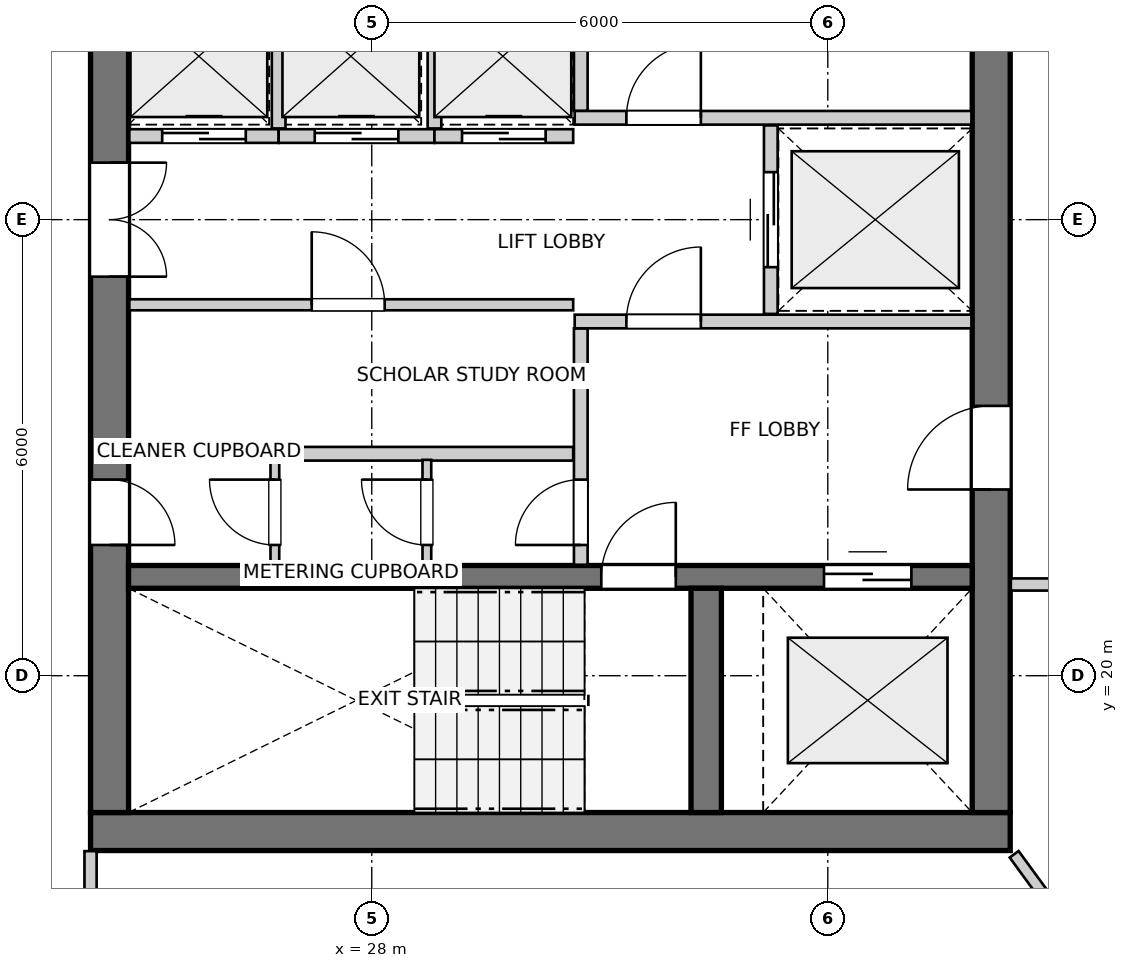
"""IFC4 building model, lengths in metres.
Left out: names, types, materials, properties, quantities, classifications, styles, units other than length and angle.
Written with IfcOpenShell. Run it as: python <this file> out.ifc"""

import sys

from ifc_helpers import new_model, si_unit, direction, frame, frame_2d, origin, place, context, subcontext, project, spatial, rectangle, extrude, source, transform, mapped, element, fill, save


model = new_model("IFC4")
c1 = context("Model", 3, precision=1e-05, world=origin(), true_north=direction((0.0, 1.0)))
c2 = subcontext(c1, "Body", "Model", "MODEL_VIEW")
j1 = project(units=[si_unit("LENGTHUNIT", "METRE"), si_unit("PLANEANGLEUNIT", "RADIAN")], contexts=[c1])
p1 = place(None, origin())
s1 = spatial("IfcSite", under=j1, at=p1, CompositionType="ELEMENT")
p2 = place(p1, origin())
s2 = spatial("IfcBuilding", under=s1, at=p2, CompositionType="ELEMENT")
p3 = place(p2, frame((0.0, 0.0, 221.2)))
s3 = spatial("IfcBuildingStorey", under=s2, at=p3, CompositionType="ELEMENT", Elevation=221.2)
p4 = place(p3, frame((24.3, 17.95, 0.0), z_axis=(0.0, 0.0, 1.0), x_axis=(1.0, 0.0, 0.0)))
e1 = element("IfcWall", 1, at=p4, inside=s3, PredefinedType="SHEAR", context=c2, shape_type="SweptSolid", body=[
    extrude(rectangle(XDim=12.1, YDim=0.5, at=frame_2d((6.05, 0.0))), origin(), (0.0, 0.0, 1.0), 2.96),
])
p5 = place(p3, frame((24.55, 33.8, 0.0), z_axis=(0.0, 0.0, 1.0), x_axis=(0.0, -1.0, 0.0)))
e2 = element("IfcWall", 2, at=p5, inside=s3, PredefinedType="SHEAR", context=c2, shape_type="SweptSolid", body=[
    extrude(rectangle(XDim=15.6, YDim=0.5, at=frame_2d((7.8, 0.0))), origin(), (0.0, 0.0, 1.0), 2.96),
])
p6 = place(p5, frame((7.05, 0.0, 0.0)))
e3 = element("IfcOpeningElement", 3, at=p6, cuts=e2, PredefinedType="OPENING", context=c2, shape_type="SweptSolid", body=[
    extrude(rectangle(XDim=1.5, YDim=2.15, at=frame_2d((0.75, 1.075))), frame((0.0, 0.26, 0.0), z_axis=(0.0, -1.0, 0.0), x_axis=(1.0, 0.0, 0.0)), (0.0, 0.0, 1.0), 0.52),
])
p7 = place(p5, frame((3.52, 0.0, 0.0)))
e4 = element("IfcOpeningElement", 4, at=p7, cuts=e2, PredefinedType="OPENING", context=c2, shape_type="SweptSolid", body=[
    extrude(rectangle(XDim=0.86, YDim=2.05, at=frame_2d((0.43, 1.025))), frame((0.0, 0.26, 0.0), z_axis=(0.0, -1.0, 0.0), x_axis=(1.0, 0.0, 0.0)), (0.0, 0.0, 1.0), 0.52),
])
p8 = place(p5, frame((11.22, 0.0, 0.0)))
e5 = element("IfcOpeningElement", 5, at=p8, cuts=e2, PredefinedType="OPENING", context=c2, shape_type="SweptSolid", body=[
    extrude(rectangle(XDim=0.86, YDim=2.05, at=frame_2d((0.43, 1.025))), frame((0.0, 0.26, 0.0), z_axis=(0.0, -1.0, 0.0), x_axis=(1.0, 0.0, 0.0)), (0.0, 0.0, 1.0), 0.52),
])
p9 = place(p3, frame((36.15, 18.2, 0.0), z_axis=(0.0, 0.0, 1.0), x_axis=(0.0, 1.0, 0.0)))
e6 = element("IfcWall", 6, at=p9, inside=s3, PredefinedType="SHEAR", context=c2, shape_type="SweptSolid", body=[
    extrude(rectangle(XDim=15.6, YDim=0.5, at=frame_2d((7.8, 0.0))), origin(), (0.0, 0.0, 1.0), 2.96),
])
p10 = place(p9, frame((4.25, 0.0, 0.0)))
e7 = element("IfcOpeningElement", 7, at=p10, cuts=e6, PredefinedType="OPENING", context=c2, shape_type="SweptSolid", body=[
    extrude(rectangle(XDim=1.1, YDim=2.15, at=frame_2d((0.55, 1.075))), frame((0.0, 0.26, 0.0), z_axis=(0.0, -1.0, 0.0), x_axis=(1.0, 0.0, 0.0)), (0.0, 0.0, 1.0), 0.52),
])
p11 = place(p9, frame((10.25, 0.0, 0.0)))
e8 = element("IfcOpeningElement", 8, at=p11, cuts=e6, PredefinedType="OPENING", context=c2, shape_type="SweptSolid", body=[
    extrude(rectangle(XDim=1.1, YDim=2.15, at=frame_2d((0.55, 1.075))), frame((0.0, 0.26, 0.0), z_axis=(0.0, -1.0, 0.0), x_axis=(1.0, 0.0, 0.0)), (0.0, 0.0, 1.0), 0.52),
])
p12 = place(p3, frame((24.8, 21.3, 0.0), z_axis=(0.0, 0.0, 1.0), x_axis=(1.0, 0.0, 0.0)))
e9 = element("IfcWall", 9, at=p12, inside=s3, PredefinedType="SHEAR", context=c2, shape_type="SweptSolid", body=[
    extrude(rectangle(XDim=11.1, YDim=0.3, at=frame_2d((5.55, 0.0))), origin(), (0.0, 0.0, 1.0), 2.96),
])
p13 = place(p12, frame((6.22, 0.0, 0.0)))
e10 = element("IfcOpeningElement", 10, at=p13, cuts=e9, PredefinedType="OPENING", context=c2, shape_type="SweptSolid", body=[
    extrude(rectangle(XDim=0.98, YDim=2.15, at=frame_2d((0.49, 1.075))), frame((0.0, 0.16, 0.0), z_axis=(0.0, -1.0, 0.0), x_axis=(1.0, 0.0, 0.0)), (0.0, 0.0, 1.0), 0.32),
])
p14 = place(p12, frame((9.15, 0.0, 0.0)))
e11 = element("IfcOpeningElement", 11, at=p14, cuts=e9, PredefinedType="OPENING", context=c2, shape_type="SweptSolid", body=[
    extrude(rectangle(XDim=1.15, YDim=2.15, at=frame_2d((0.575, 1.075))), frame((0.0, 0.16, 0.0), z_axis=(0.0, -1.0, 0.0), x_axis=(1.0, 0.0, 0.0)), (0.0, 0.0, 1.0), 0.32),
])
p15 = place(p3, frame((32.4, 18.2, 0.0), z_axis=(0.0, 0.0, 1.0), x_axis=(0.0, 1.0, 0.0)))
e12 = element("IfcWall", 12, at=p15, inside=s3, PredefinedType="SHEAR", context=c2, shape_type="SweptSolid", body=[
    extrude(rectangle(XDim=2.95, YDim=0.4, at=frame_2d((1.475, 0.0))), origin(), (0.0, 0.0, 1.0), 2.96),
])
p16 = place(p3, frame((30.75, 21.46, 0.0), z_axis=(0.0, 0.0, 1.0), x_axis=(0.0, 1.0, 0.0)))
e13 = element("IfcWall", 13, at=p16, inside=s3, PredefinedType="PARTITIONING", context=c2, shape_type="SweptSolid", body=[
    extrude(rectangle(XDim=3.11, YDim=0.18, at=frame_2d((1.555, 0.0))), origin(), (0.0, 0.0, 1.0), 2.96),
])
p17 = place(p16, frame((0.26, 0.0, 0.0)))
e14 = element("IfcOpeningElement", 14, at=p17, cuts=e13, PredefinedType="OPENING", context=c2, shape_type="SweptSolid", body=[
    extrude(rectangle(XDim=0.86, YDim=2.05, at=frame_2d((0.43, 1.025))), frame((0.0, 0.1, 0.0), z_axis=(0.0, -1.0, 0.0), x_axis=(1.0, 0.0, 0.0)), (0.0, 0.0, 1.0), 0.2),
])
p18 = place(p3, frame((30.67, 24.66, 0.0), z_axis=(0.0, 0.0, 1.0), x_axis=(1.0, 0.0, 0.0)))
e15 = element("IfcWall", 15, at=p18, inside=s3, PredefinedType="PARTITIONING", context=c2, shape_type="SweptSolid", body=[
    extrude(rectangle(XDim=5.22, YDim=0.18, at=frame_2d((2.61, 0.0))), origin(), (0.0, 0.0, 1.0), 2.96),
])
p19 = place(p18, frame((0.68, 0.0, 0.0)))
e16 = element("IfcOpeningElement", 16, at=p19, cuts=e15, PredefinedType="OPENING", context=c2, shape_type="SweptSolid", body=[
    extrude(rectangle(XDim=0.98, YDim=2.15, at=frame_2d((0.49, 1.075))), frame((0.0, 0.1, 0.0), z_axis=(0.0, -1.0, 0.0), x_axis=(1.0, 0.0, 0.0)), (0.0, 0.0, 1.0), 0.2),
])
p20 = place(p3, frame((30.75, 27.43, 0.0), z_axis=(0.0, 0.0, 1.0), x_axis=(0.0, 1.0, 0.0)))
e17 = element("IfcWall", 17, at=p20, inside=s3, PredefinedType="PARTITIONING", context=c2, shape_type="SweptSolid", body=[
    extrude(rectangle(XDim=3.11, YDim=0.18, at=frame_2d((1.555, 0.0))), origin(), (0.0, 0.0, 1.0), 2.96),
])
p21 = place(p20, frame((1.98, 0.0, 0.0)))
e18 = element("IfcOpeningElement", 18, at=p21, cuts=e17, PredefinedType="OPENING", context=c2, shape_type="SweptSolid", body=[
    extrude(rectangle(XDim=0.86, YDim=2.05, at=frame_2d((0.43, 1.025))), frame((0.0, 0.1, 0.0), z_axis=(0.0, -1.0, 0.0), x_axis=(1.0, 0.0, 0.0)), (0.0, 0.0, 1.0), 0.2),
])
p22 = place(p3, frame((30.67, 27.34, 0.0), z_axis=(0.0, 0.0, 1.0), x_axis=(1.0, 0.0, 0.0)))
e19 = element("IfcWall", 19, at=p22, inside=s3, PredefinedType="PARTITIONING", context=c2, shape_type="SweptSolid", body=[
    extrude(rectangle(XDim=5.22, YDim=0.18, at=frame_2d((2.61, 0.0))), origin(), (0.0, 0.0, 1.0), 2.96),
])
p23 = place(p22, frame((0.68, 0.0, 0.0)))
e20 = element("IfcOpeningElement", 20, at=p23, cuts=e19, PredefinedType="OPENING", context=c2, shape_type="SweptSolid", body=[
    extrude(rectangle(XDim=0.98, YDim=2.15, at=frame_2d((0.49, 1.075))), frame((0.0, 0.1, 0.0), z_axis=(0.0, -1.0, 0.0), x_axis=(1.0, 0.0, 0.0)), (0.0, 0.0, 1.0), 0.2),
])
p24 = place(p3, frame((33.25, 24.76, 0.0), z_axis=(0.0, 0.0, 1.0), x_axis=(0.0, 1.0, 0.0)))
e21 = element("IfcWall", 21, at=p24, inside=s3, PredefinedType="PARTITIONING", context=c2, shape_type="SweptSolid", body=[
    extrude(rectangle(XDim=2.48, YDim=0.18, at=frame_2d((1.24, 0.0))), origin(), (0.0, 0.0, 1.0), 2.96),
])
p25 = place(p24, frame((0.615, 0.0, 0.0)))
e22 = element("IfcOpeningElement", 22, at=p25, cuts=e21, PredefinedType="OPENING", context=c2, shape_type="SweptSolid", body=[
    extrude(rectangle(XDim=1.25, YDim=2.15, at=frame_2d((0.625, 1.075))), frame((0.0, 0.1, 0.0), z_axis=(0.0, -1.0, 0.0), x_axis=(1.0, 0.0, 0.0)), (0.0, 0.0, 1.0), 0.2),
])
p26 = place(p3, frame((24.81, 22.92, 0.0), z_axis=(0.0, 0.0, 1.0), x_axis=(1.0, 0.0, 0.0)))
e23 = element("IfcWall", 23, at=p26, inside=s3, PredefinedType="PARTITIONING", context=c2, shape_type="SweptSolid", body=[
    extrude(rectangle(XDim=5.84, YDim=0.18, at=frame_2d((2.92, 0.0))), origin(), (0.0, 0.0, 1.0), 2.96),
])
p27 = place(p3, frame((24.81, 24.88, 0.0), z_axis=(0.0, 0.0, 1.0), x_axis=(1.0, 0.0, 0.0)))
e24 = element("IfcWall", 24, at=p27, inside=s3, PredefinedType="PARTITIONING", context=c2, shape_type="SweptSolid", body=[
    extrude(rectangle(XDim=5.84, YDim=0.145, at=frame_2d((2.92, 0.0))), origin(), (0.0, 0.0, 1.0), 2.96),
])
p28 = place(p27, frame((2.4, 0.0, 0.0)))
e25 = element("IfcOpeningElement", 25, at=p28, cuts=e24, PredefinedType="OPENING", context=c2, shape_type="SweptSolid", body=[
    extrude(rectangle(XDim=0.96, YDim=2.1, at=frame_2d((0.48, 1.05))), frame((0.0, 0.083, 0.0), z_axis=(0.0, -1.0, 0.0), x_axis=(1.0, 0.0, 0.0)), (0.0, 0.0, 1.0), 0.165),
])
p29 = place(p3, frame((24.81, 27.1, 0.0), z_axis=(0.0, 0.0, 1.0), x_axis=(1.0, 0.0, 0.0)))
e26 = element("IfcWall", 26, at=p29, inside=s3, PredefinedType="PARTITIONING", context=c2, shape_type="SweptSolid", body=[
    extrude(rectangle(XDim=1.965, YDim=0.18, at=frame_2d((0.982, 0.0))), origin(), (0.0, 0.0, 1.0), 2.96),
])
p30 = place(p29, frame((0.433, 0.0, 0.0)))
e27 = element("IfcOpeningElement", 27, at=p30, cuts=e26, PredefinedType="OPENING", context=c2, shape_type="SweptSolid", body=[
    extrude(rectangle(XDim=1.1, YDim=2.15, at=frame_2d((0.55, 1.075))), frame((0.0, 0.1, 0.0), z_axis=(0.0, -1.0, 0.0), x_axis=(1.0, 0.0, 0.0)), (0.0, 0.0, 1.0), 0.2),
])
p31 = place(p3, frame((26.775, 27.1, 0.0), z_axis=(0.0, 0.0, 1.0), x_axis=(1.0, 0.0, 0.0)))
e28 = element("IfcWall", 28, at=p31, inside=s3, PredefinedType="PARTITIONING", context=c2, shape_type="SweptSolid", body=[
    extrude(rectangle(XDim=2.05, YDim=0.18, at=frame_2d((1.025, 0.0))), origin(), (0.0, 0.0, 1.0), 2.96),
])
p32 = place(p31, frame((0.475, 0.0, 0.0)))
e29 = element("IfcOpeningElement", 29, at=p32, cuts=e28, PredefinedType="OPENING", context=c2, shape_type="SweptSolid", body=[
    extrude(rectangle(XDim=1.1, YDim=2.15, at=frame_2d((0.55, 1.075))), frame((0.0, 0.1, 0.0), z_axis=(0.0, -1.0, 0.0), x_axis=(1.0, 0.0, 0.0)), (0.0, 0.0, 1.0), 0.2),
])
p33 = place(p3, frame((26.775, 27.2, 0.0), z_axis=(0.0, 0.0, 1.0), x_axis=(0.0, 1.0, 0.0)))
e30 = element("IfcWall", 30, at=p33, inside=s3, PredefinedType="PARTITIONING", context=c2, shape_type="SweptSolid", body=[
    extrude(rectangle(XDim=1.78, YDim=0.18, at=frame_2d((0.89, 0.0))), origin(), (0.0, 0.0, 1.0), 2.96),
])
p34 = place(p3, frame((28.825, 27.1, 0.0), z_axis=(0.0, 0.0, 1.0), x_axis=(1.0, 0.0, 0.0)))
e31 = element("IfcWall", 31, at=p34, inside=s3, PredefinedType="PARTITIONING", context=c2, shape_type="SweptSolid", body=[
    extrude(rectangle(XDim=1.825, YDim=0.18, at=frame_2d((0.913, 0.0))), origin(), (0.0, 0.0, 1.0), 2.96),
])
p35 = place(p34, frame((0.363, 0.0, 0.0)))
e32 = element("IfcOpeningElement", 32, at=p35, cuts=e31, PredefinedType="OPENING", context=c2, shape_type="SweptSolid", body=[
    extrude(rectangle(XDim=1.1, YDim=2.15, at=frame_2d((0.55, 1.075))), frame((0.0, 0.1, 0.0), z_axis=(0.0, -1.0, 0.0), x_axis=(1.0, 0.0, 0.0)), (0.0, 0.0, 1.0), 0.2),
])
p36 = place(p3, frame((28.825, 27.2, 0.0), z_axis=(0.0, 0.0, 1.0), x_axis=(0.0, 1.0, 0.0)))
e33 = element("IfcWall", 33, at=p36, inside=s3, PredefinedType="PARTITIONING", context=c2, shape_type="SweptSolid", body=[
    extrude(rectangle(XDim=1.78, YDim=0.18, at=frame_2d((0.89, 0.0))), origin(), (0.0, 0.0, 1.0), 2.96),
])
p37 = place(p3, frame((26.725, 21.46, 0.0), z_axis=(0.0, 0.0, 1.0), x_axis=(0.0, 1.0, 0.0)))
e34 = element("IfcWall", 34, at=p37, inside=s3, PredefinedType="PARTITIONING", context=c2, shape_type="SweptSolid", body=[
    extrude(rectangle(XDim=1.38, YDim=0.115, at=frame_2d((0.69, 0.0))), origin(), (0.0, 0.0, 1.0), 2.96),
])
p38 = place(p37, frame((0.26, 0.0, 0.0)))
e35 = element("IfcOpeningElement", 35, at=p38, cuts=e34, PredefinedType="OPENING", context=c2, shape_type="SweptSolid", body=[
    extrude(rectangle(XDim=0.86, YDim=2.05, at=frame_2d((0.43, 1.025))), frame((0.0, 0.067, 0.0), z_axis=(0.0, -1.0, 0.0), x_axis=(1.0, 0.0, 0.0)), (0.0, 0.0, 1.0), 0.135),
])
p39 = place(p3, frame((28.725, 21.46, 0.0), z_axis=(0.0, 0.0, 1.0), x_axis=(0.0, 1.0, 0.0)))
e36 = element("IfcWall", 36, at=p39, inside=s3, PredefinedType="PARTITIONING", context=c2, shape_type="SweptSolid", body=[
    extrude(rectangle(XDim=1.38, YDim=0.115, at=frame_2d((0.69, 0.0))), origin(), (0.0, 0.0, 1.0), 2.96),
])
p40 = place(p39, frame((0.26, 0.0, 0.0)))
e37 = element("IfcOpeningElement", 37, at=p40, cuts=e36, PredefinedType="OPENING", context=c2, shape_type="SweptSolid", body=[
    extrude(rectangle(XDim=0.86, YDim=2.05, at=frame_2d((0.43, 1.025))), frame((0.0, 0.067, 0.0), z_axis=(0.0, -1.0, 0.0), x_axis=(1.0, 0.0, 0.0)), (0.0, 0.0, 1.0), 0.135),
])
p41 = place(p3, frame((38.02, 21.2, 0.0), z_axis=(0.0, 0.0, 1.0), x_axis=(-1.0, 0.0, 0.0)))
e38 = element("IfcWall", 38, at=p41, inside=s3, PredefinedType="PARTITIONING", context=c2, shape_type="SweptSolid", body=[
    extrude(rectangle(XDim=1.612, YDim=0.16, at=frame_2d((0.806, 0.0))), origin(), (0.0, 0.0, 1.0), 2.96),
])
p42 = place(p41, frame((0.12, 0.0, 0.0)))
e39 = element("IfcOpeningElement", 39, at=p42, cuts=e38, PredefinedType="OPENING", context=c2, shape_type="SweptSolid", body=[
    extrude(rectangle(XDim=0.88, YDim=2.0, at=frame_2d((0.44, 1.0))), frame((0.0, 0.09, 0.0), z_axis=(0.0, -1.0, 0.0), x_axis=(1.0, 0.0, 0.0)), (0.0, 0.0, 1.0), 0.18),
])
p43 = place(p3, frame((36.452, 17.651, 0.0), z_axis=(0.0, 0.0, 1.0), x_axis=(0.58995882053, -0.807433334758, 0.0)))
e40 = element("IfcWall", 40, at=p43, inside=s3, PredefinedType="PARTITIONING", context=c2, shape_type="SweptSolid", body=[
    extrude(rectangle(XDim=5.722, YDim=0.145, at=frame_2d((2.861, 0.0))), origin(), (0.0, 0.0, 1.0), 2.96),
])
p44 = place(p3, frame((24.3, 15.042, 0.0), z_axis=(0.0, 0.0, 1.0), x_axis=(0.0, 1.0, 0.0)))
e41 = element("IfcWall", 41, at=p44, inside=s3, PredefinedType="PARTITIONING", context=c2, shape_type="SweptSolid", body=[
    extrude(rectangle(XDim=2.65, YDim=0.16, at=frame_2d((1.325, 0.0))), origin(), (0.0, 0.0, 1.0), 1.728),
])
m1 = source(origin(), c2, "Body", "SweptSolid", [
    extrude(rectangle(XDim=0.98, YDim=2.15, at=frame_2d((0.49, 1.075))), frame((0.0, 0.025, 0.0), z_axis=(0.0, -1.0, 0.0), x_axis=(1.0, 0.0, 0.0)), (0.0, 0.0, 1.0), 0.05),
])
p45 = place(p13, origin())
e42 = element("IfcDoor", 42, at=p45, inside=s3, OperationType="SINGLE_SWING_RIGHT", PredefinedType="DOOR", context=c2, shape_type="MappedRepresentation", body=[
    mapped(m1, transform((0.0, 0.0, 0.0), x_axis=(1.0, 0.0, 0.0), y_axis=(0.0, 1.0, 0.0), z_axis=(0.0, 0.0, 1.0), scale=1.0)),
])
fill(e10, e42)
m2 = source(origin(), c2, "Body", "SweptSolid", [
    extrude(rectangle(XDim=1.15, YDim=2.15, at=frame_2d((0.575, 1.075))), frame((0.0, 0.025, 0.0), z_axis=(0.0, -1.0, 0.0), x_axis=(1.0, 0.0, 0.0)), (0.0, 0.0, 1.0), 0.05),
])
p46 = place(p14, origin())
e43 = element("IfcDoor", 43, at=p46, inside=s3, OperationType="DOUBLE_DOOR_SLIDING", PredefinedType="DOOR", context=c2, shape_type="MappedRepresentation", body=[
    mapped(m2, transform((0.0, 0.0, 0.0), x_axis=(1.0, 0.0, 0.0), y_axis=(0.0, 1.0, 0.0), z_axis=(0.0, 0.0, 1.0), scale=1.0)),
])
fill(e11, e43)
m3 = source(origin(), c2, "Body", "SweptSolid", [
    extrude(rectangle(XDim=1.1, YDim=2.15, at=frame_2d((0.55, 1.075))), frame((0.0, 0.025, 0.0), z_axis=(0.0, -1.0, 0.0), x_axis=(1.0, 0.0, 0.0)), (0.0, 0.0, 1.0), 0.05),
])
p47 = place(p10, origin())
e44 = element("IfcDoor", 44, at=p47, inside=s3, OperationType="SINGLE_SWING_LEFT", PredefinedType="DOOR", context=c2, shape_type="MappedRepresentation", body=[
    mapped(m3, transform((0.0, 0.0, 0.0), x_axis=(1.0, 0.0, 0.0), y_axis=(0.0, 1.0, 0.0), z_axis=(0.0, 0.0, 1.0), scale=1.0)),
])
fill(e7, e44)
m4 = source(origin(), c2, "Body", "SweptSolid", [
    extrude(rectangle(XDim=1.5, YDim=2.15, at=frame_2d((0.75, 1.075))), frame((0.0, 0.025, 0.0), z_axis=(0.0, -1.0, 0.0), x_axis=(1.0, 0.0, 0.0)), (0.0, 0.0, 1.0), 0.05),
])
p48 = place(p6, origin())
e45 = element("IfcDoor", 45, at=p48, inside=s3, OperationType="DOUBLE_DOOR_SINGLE_SWING", PredefinedType="DOOR", context=c2, shape_type="MappedRepresentation", body=[
    mapped(m4, transform((0.0, 0.0, 0.0), x_axis=(1.0, 0.0, 0.0), y_axis=(0.0, 1.0, 0.0), z_axis=(0.0, 0.0, 1.0), scale=1.0)),
])
fill(e3, e45)
m5 = source(origin(), c2, "Body", "SweptSolid", [
    extrude(rectangle(XDim=0.86, YDim=2.05, at=frame_2d((0.43, 1.025))), frame((0.0, 0.025, 0.0), z_axis=(0.0, -1.0, 0.0), x_axis=(1.0, 0.0, 0.0)), (0.0, 0.0, 1.0), 0.05),
])
p49 = place(p8, origin())
e46 = element("IfcDoor", 46, at=p49, inside=s3, OperationType="SINGLE_SWING_RIGHT", PredefinedType="DOOR", context=c2, shape_type="MappedRepresentation", body=[
    mapped(m5, transform((0.0, 0.0, 0.0), x_axis=(1.0, 0.0, 0.0), y_axis=(0.0, 1.0, 0.0), z_axis=(0.0, 0.0, 1.0), scale=1.0)),
])
fill(e5, e46)
p50 = place(p17, origin())
e47 = element("IfcDoor", 47, at=p50, inside=s3, OperationType="SINGLE_SWING_LEFT", PredefinedType="DOOR", context=c2, shape_type="MappedRepresentation", body=[
    mapped(m5, transform((0.0, 0.0, 0.0), x_axis=(1.0, 0.0, 0.0), y_axis=(0.0, 1.0, 0.0), z_axis=(0.0, 0.0, 1.0), scale=1.0)),
])
fill(e14, e47)
p51 = place(p19, origin())
e48 = element("IfcDoor", 48, at=p51, inside=s3, OperationType="SINGLE_SWING_RIGHT", PredefinedType="DOOR", context=c2, shape_type="MappedRepresentation", body=[
    mapped(m1, transform((0.0, 0.0, 0.0), x_axis=(1.0, 0.0, 0.0), y_axis=(0.0, 1.0, 0.0), z_axis=(0.0, 0.0, 1.0), scale=1.0)),
])
fill(e16, e48)
p52 = place(p23, origin())
e49 = element("IfcDoor", 49, at=p52, inside=s3, OperationType="SINGLE_SWING_RIGHT", PredefinedType="DOOR", context=c2, shape_type="MappedRepresentation", body=[
    mapped(m1, transform((0.0, 0.0, 0.0), x_axis=(1.0, 0.0, 0.0), y_axis=(0.0, 1.0, 0.0), z_axis=(0.0, 0.0, 1.0), scale=1.0)),
])
fill(e20, e49)
m6 = source(origin(), c2, "Body", "SweptSolid", [
    extrude(rectangle(XDim=1.25, YDim=2.15, at=frame_2d((0.625, 1.075))), frame((0.0, 0.025, 0.0), z_axis=(0.0, -1.0, 0.0), x_axis=(1.0, 0.0, 0.0)), (0.0, 0.0, 1.0), 0.05),
])
p53 = place(p25, origin())
e50 = element("IfcDoor", 50, at=p53, inside=s3, OperationType="DOUBLE_DOOR_SLIDING", PredefinedType="DOOR", context=c2, shape_type="MappedRepresentation", body=[
    mapped(m6, transform((0.0, 0.0, 0.0), x_axis=(1.0, 0.0, 0.0), y_axis=(0.0, 1.0, 0.0), z_axis=(0.0, 0.0, 1.0), scale=1.0)),
])
fill(e22, e50)
m7 = source(origin(), c2, "Body", "SweptSolid", [
    extrude(rectangle(XDim=0.96, YDim=2.1, at=frame_2d((0.48, 1.05))), frame((0.0, 0.025, 0.0), z_axis=(0.0, -1.0, 0.0), x_axis=(1.0, 0.0, 0.0)), (0.0, 0.0, 1.0), 0.05),
])
p54 = place(p28, origin())
e51 = element("IfcDoor", 51, at=p54, inside=s3, OperationType="SINGLE_SWING_LEFT", PredefinedType="DOOR", context=c2, shape_type="MappedRepresentation", body=[
    mapped(m7, transform((0.0, 0.0, 0.0), x_axis=(1.0, 0.0, 0.0), y_axis=(0.0, 1.0, 0.0), z_axis=(0.0, 0.0, 1.0), scale=1.0)),
])
fill(e25, e51)
p55 = place(p30, origin())
e52 = element("IfcDoor", 52, at=p55, inside=s3, OperationType="DOUBLE_DOOR_SLIDING", PredefinedType="DOOR", context=c2, shape_type="MappedRepresentation", body=[
    mapped(m3, transform((0.0, 0.0, 0.0), x_axis=(1.0, 0.0, 0.0), y_axis=(0.0, 1.0, 0.0), z_axis=(0.0, 0.0, 1.0), scale=1.0)),
])
fill(e27, e52)
p56 = place(p32, origin())
e53 = element("IfcDoor", 53, at=p56, inside=s3, OperationType="DOUBLE_DOOR_SLIDING", PredefinedType="DOOR", context=c2, shape_type="MappedRepresentation", body=[
    mapped(m3, transform((0.0, 0.0, 0.0), x_axis=(1.0, 0.0, 0.0), y_axis=(0.0, 1.0, 0.0), z_axis=(0.0, 0.0, 1.0), scale=1.0)),
])
fill(e29, e53)
p57 = place(p35, origin())
e54 = element("IfcDoor", 54, at=p57, inside=s3, OperationType="DOUBLE_DOOR_SLIDING", PredefinedType="DOOR", context=c2, shape_type="MappedRepresentation", body=[
    mapped(m3, transform((0.0, 0.0, 0.0), x_axis=(1.0, 0.0, 0.0), y_axis=(0.0, 1.0, 0.0), z_axis=(0.0, 0.0, 1.0), scale=1.0)),
])
fill(e32, e54)
p58 = place(p38, origin())
e55 = element("IfcDoor", 55, at=p58, inside=s3, OperationType="SINGLE_SWING_RIGHT", PredefinedType="DOOR", context=c2, shape_type="MappedRepresentation", body=[
    mapped(m5, transform((0.0, 0.0, 0.0), x_axis=(1.0, 0.0, 0.0), y_axis=(0.0, 1.0, 0.0), z_axis=(0.0, 0.0, 1.0), scale=1.0)),
])
fill(e35, e55)
p59 = place(p40, origin())
e56 = element("IfcDoor", 56, at=p59, inside=s3, OperationType="SINGLE_SWING_RIGHT", PredefinedType="DOOR", context=c2, shape_type="MappedRepresentation", body=[
    mapped(m5, transform((0.0, 0.0, 0.0), x_axis=(1.0, 0.0, 0.0), y_axis=(0.0, 1.0, 0.0), z_axis=(0.0, 0.0, 1.0), scale=1.0)),
])
fill(e37, e56)
save(model, sys.argv[1])
